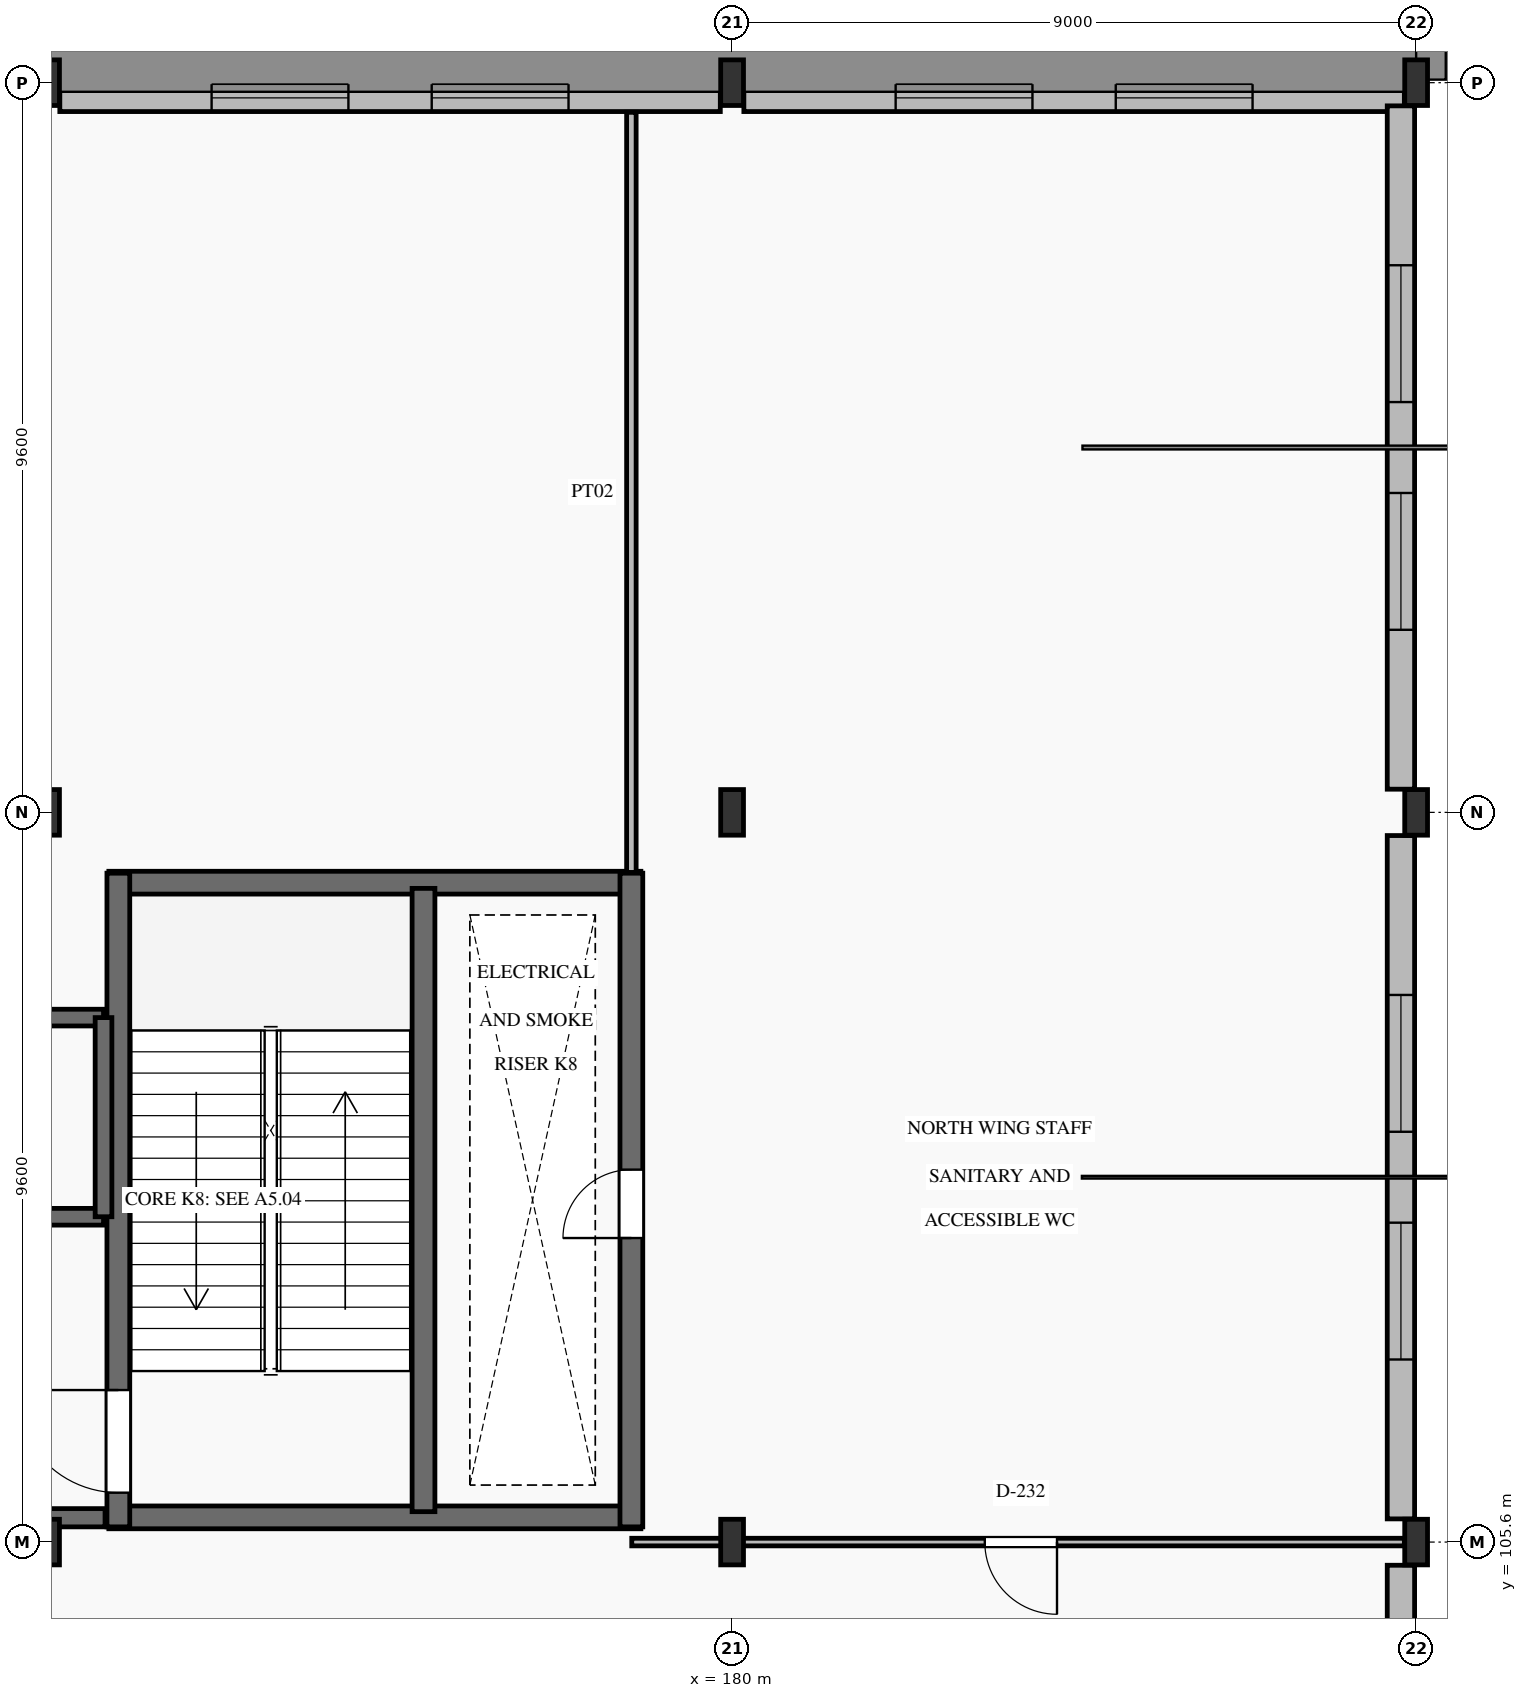
"""IFC4 building model, lengths in metres.
Left out: names, types, materials, properties, quantities, classifications, styles, units other than length and angle.
Written with IfcOpenShell. Run it as: python <this file> out.ifc"""

import sys

from ifc_helpers import new_model, si_unit, direction, frame, frame_2d, origin, origin_2d, place, context, subcontext, project, spatial, rectangle, i_section, extrude, element, fill, save


model = new_model("IFC4")
c1 = context("Model", 3, precision=1e-05, world=origin(), true_north=direction((0.0, 1.0)))
c2 = subcontext(c1, "Body", "Model", "MODEL_VIEW")
j1 = project(units=[si_unit("LENGTHUNIT", "METRE"), si_unit("PLANEANGLEUNIT", "RADIAN")], contexts=[c1])
p1 = place(None, origin())
s1 = spatial("IfcSite", under=j1, at=p1, CompositionType="ELEMENT")
p2 = place(p1, origin())
s2 = spatial("IfcBuilding", under=s1, at=p2, CompositionType="ELEMENT")
p3 = place(p2, origin())
s3 = spatial("IfcBuildingStorey", under=s2, at=p3, CompositionType="ELEMENT", Elevation=0.0)
for number, where, z_axis, x_axis in (
    (1, (171.0, 105.6, 0.0), (0.0, 0.0, 1.0), (1.0, 0.0, 0.0)),
    (2, (171.0, 115.2, 0.0), (0.0, 0.0, 1.0), (1.0, 0.0, 0.0)),
    (3, (171.0, 124.8, 0.0), (0.0, 0.0, 1.0), (1.0, 0.0, 0.0)),
    (4, (180.0, 105.6, 0.0), (0.0, 0.0, 1.0), (1.0, 0.0, 0.0)),
    (5, (180.0, 115.2, 0.0), (0.0, 0.0, 1.0), (1.0, 0.0, 0.0)),
    (6, (180.0, 124.8, 0.0), (0.0, 0.0, 1.0), (1.0, 0.0, 0.0)),
    (7, (189.0, 105.6, 0.0), (0.0, 0.0, 1.0), (1.0, 0.0, 0.0)),
    (8, (189.0, 115.2, 0.0), (0.0, 0.0, 1.0), (1.0, 0.0, 0.0)),
    (9, (189.0, 124.8, 0.0), (0.0, 0.0, 1.0), (1.0, 0.0, 0.0)),
):
    element("IfcColumn", number, at=place(p3, frame(where, z_axis=z_axis, x_axis=x_axis)), inside=s3, PredefinedType="COLUMN", context=c2, shape_type="SweptSolid", body=[
        extrude(i_section(OverallWidth=0.3, OverallDepth=0.6, WebThickness=0.015, FlangeThickness=0.03, FilletRadius=0.027, at=origin_2d()), origin(), (0.0, 0.0, 1.0), 6.0),
    ])
p4 = place(p3, frame((171.155, 124.6, 0.0), z_axis=(0.0, 0.0, 1.0), x_axis=(1.0, 0.0, 0.0)))
e10 = element("IfcWall", 10, at=p4, inside=s3, PredefinedType="SOLIDWALL", context=c2, shape_type="SweptSolid", body=[
    extrude(rectangle(XDim=8.69, YDim=0.36, at=frame_2d((4.345, 0.0))), origin(), (0.0, 0.0, 1.0), 5.49),
])
p5 = place(p4, frame((1.997, 0.0, 0.95)))
e11 = element("IfcOpeningElement", 11, at=p5, cuts=e10, PredefinedType="OPENING", context=c2, shape_type="SweptSolid", body=[
    extrude(rectangle(XDim=1.8, YDim=2.8, at=frame_2d((0.9, 1.4))), frame((0.0, 0.195, 0.0), z_axis=(0.0, -1.0, 0.0), x_axis=(1.0, 0.0, 0.0)), (0.0, 0.0, 1.0), 0.39),
])
p6 = place(p4, frame((4.893, 0.0, 0.95)))
e12 = element("IfcOpeningElement", 12, at=p6, cuts=e10, PredefinedType="OPENING", context=c2, shape_type="SweptSolid", body=[
    extrude(rectangle(XDim=1.8, YDim=2.8, at=frame_2d((0.9, 1.4))), frame((0.0, 0.195, 0.0), z_axis=(0.0, -1.0, 0.0), x_axis=(1.0, 0.0, 0.0)), (0.0, 0.0, 1.0), 0.39),
])
p7 = place(p3, frame((180.155, 124.6, 0.0), z_axis=(0.0, 0.0, 1.0), x_axis=(1.0, 0.0, 0.0)))
e13 = element("IfcWall", 13, at=p7, inside=s3, PredefinedType="SOLIDWALL", context=c2, shape_type="SweptSolid", body=[
    extrude(rectangle(XDim=8.69, YDim=0.36, at=frame_2d((4.345, 0.0))), origin(), (0.0, 0.0, 1.0), 5.49),
])
p8 = place(p7, frame((1.997, 0.0, 0.95)))
e14 = element("IfcOpeningElement", 14, at=p8, cuts=e13, PredefinedType="OPENING", context=c2, shape_type="SweptSolid", body=[
    extrude(rectangle(XDim=1.8, YDim=2.8, at=frame_2d((0.9, 1.4))), frame((0.0, 0.195, 0.0), z_axis=(0.0, -1.0, 0.0), x_axis=(1.0, 0.0, 0.0)), (0.0, 0.0, 1.0), 0.39),
])
p9 = place(p7, frame((4.893, 0.0, 0.95)))
e15 = element("IfcOpeningElement", 15, at=p9, cuts=e13, PredefinedType="OPENING", context=c2, shape_type="SweptSolid", body=[
    extrude(rectangle(XDim=1.8, YDim=2.8, at=frame_2d((0.9, 1.4))), frame((0.0, 0.195, 0.0), z_axis=(0.0, -1.0, 0.0), x_axis=(1.0, 0.0, 0.0)), (0.0, 0.0, 1.0), 0.39),
])
p10 = place(p3, frame((188.8, 96.305, 0.0), z_axis=(0.0, 0.0, 1.0), x_axis=(0.0, 1.0, 0.0)))
e16 = element("IfcWall", 16, at=p10, inside=s3, PredefinedType="SOLIDWALL", context=c2, shape_type="SweptSolid", body=[
    extrude(rectangle(XDim=8.99, YDim=0.36, at=frame_2d((4.495, 0.0))), origin(), (0.0, 0.0, 1.0), 5.4),
])
p11 = place(p10, frame((2.097, 0.0, 0.95)))
e17 = element("IfcOpeningElement", 17, at=p11, cuts=e16, PredefinedType="OPENING", context=c2, shape_type="SweptSolid", body=[
    extrude(rectangle(XDim=1.8, YDim=2.8, at=frame_2d((0.9, 1.4))), frame((0.0, 0.195, 0.0), z_axis=(0.0, -1.0, 0.0), x_axis=(1.0, 0.0, 0.0)), (0.0, 0.0, 1.0), 0.39),
])
p12 = place(p10, frame((5.093, 0.0, 0.95)))
e18 = element("IfcOpeningElement", 18, at=p12, cuts=e16, PredefinedType="OPENING", context=c2, shape_type="SweptSolid", body=[
    extrude(rectangle(XDim=1.8, YDim=2.8, at=frame_2d((0.9, 1.4))), frame((0.0, 0.195, 0.0), z_axis=(0.0, -1.0, 0.0), x_axis=(1.0, 0.0, 0.0)), (0.0, 0.0, 1.0), 0.39),
])
p13 = place(p3, frame((188.8, 105.905, 0.0), z_axis=(0.0, 0.0, 1.0), x_axis=(0.0, 1.0, 0.0)))
e19 = element("IfcWall", 19, at=p13, inside=s3, PredefinedType="SOLIDWALL", context=c2, shape_type="SweptSolid", body=[
    extrude(rectangle(XDim=8.99, YDim=0.36, at=frame_2d((4.495, 0.0))), origin(), (0.0, 0.0, 1.0), 5.4),
])
p14 = place(p13, frame((2.097, 0.0, 0.95)))
e20 = element("IfcOpeningElement", 20, at=p14, cuts=e19, PredefinedType="OPENING", context=c2, shape_type="SweptSolid", body=[
    extrude(rectangle(XDim=1.8, YDim=2.8, at=frame_2d((0.9, 1.4))), frame((0.0, 0.195, 0.0), z_axis=(0.0, -1.0, 0.0), x_axis=(1.0, 0.0, 0.0)), (0.0, 0.0, 1.0), 0.39),
])
p15 = place(p13, frame((5.093, 0.0, 0.95)))
e21 = element("IfcOpeningElement", 21, at=p15, cuts=e19, PredefinedType="OPENING", context=c2, shape_type="SweptSolid", body=[
    extrude(rectangle(XDim=1.8, YDim=2.8, at=frame_2d((0.9, 1.4))), frame((0.0, 0.195, 0.0), z_axis=(0.0, -1.0, 0.0), x_axis=(1.0, 0.0, 0.0)), (0.0, 0.0, 1.0), 0.39),
])
p16 = place(p3, frame((188.8, 115.505, 0.0), z_axis=(0.0, 0.0, 1.0), x_axis=(0.0, 1.0, 0.0)))
e22 = element("IfcWall", 22, at=p16, inside=s3, PredefinedType="SOLIDWALL", context=c2, shape_type="SweptSolid", body=[
    extrude(rectangle(XDim=8.99, YDim=0.36, at=frame_2d((4.495, 0.0))), origin(), (0.0, 0.0, 1.0), 5.4),
])
p17 = place(p16, frame((2.097, 0.0, 0.95)))
e23 = element("IfcOpeningElement", 23, at=p17, cuts=e22, PredefinedType="OPENING", context=c2, shape_type="SweptSolid", body=[
    extrude(rectangle(XDim=1.8, YDim=2.8, at=frame_2d((0.9, 1.4))), frame((0.0, 0.195, 0.0), z_axis=(0.0, -1.0, 0.0), x_axis=(1.0, 0.0, 0.0)), (0.0, 0.0, 1.0), 0.39),
])
p18 = place(p16, frame((5.093, 0.0, 0.95)))
e24 = element("IfcOpeningElement", 24, at=p18, cuts=e22, PredefinedType="OPENING", context=c2, shape_type="SweptSolid", body=[
    extrude(rectangle(XDim=1.8, YDim=2.8, at=frame_2d((0.9, 1.4))), frame((0.0, 0.195, 0.0), z_axis=(0.0, -1.0, 0.0), x_axis=(1.0, 0.0, 0.0)), (0.0, 0.0, 1.0), 0.39),
])
for number, where, z_axis, x_axis in (
    (25, (171.8, 105.925, 0.0), (0.0, 0.0, 1.0), (1.0, 0.0, 0.0)),
    (26, (171.8, 114.275, 0.0), (0.0, 0.0, 1.0), (1.0, 0.0, 0.0)),
):
    element("IfcWall", number, at=place(p3, frame(where, z_axis=z_axis, x_axis=x_axis)), inside=s3, PredefinedType="SHEAR", context=c2, shape_type="SweptSolid", body=[
        extrude(rectangle(XDim=7.0, YDim=0.3, at=frame_2d((3.5, 0.0))), origin(), (0.0, 0.0, 1.0), 6.0),
    ])
p19 = place(p3, frame((171.925, 105.8, 0.0), z_axis=(0.0, 0.0, 1.0), x_axis=(0.0, 1.0, 0.0)))
e27 = element("IfcWall", 27, at=p19, inside=s3, PredefinedType="SHEAR", context=c2, shape_type="SweptSolid", body=[
    extrude(rectangle(XDim=8.6, YDim=0.3, at=frame_2d((4.3, 0.0))), origin(), (0.0, 0.0, 1.0), 6.0),
])
p20 = place(p19, frame((0.45, 0.0, 0.0)))
e28 = element("IfcOpeningElement", 28, at=p20, cuts=e27, PredefinedType="OPENING", context=c2, shape_type="SweptSolid", body=[
    extrude(rectangle(XDim=1.35, YDim=2.2, at=frame_2d((0.675, 1.1))), frame((0.0, 0.165, 0.0), z_axis=(0.0, -1.0, 0.0), x_axis=(1.0, 0.0, 0.0)), (0.0, 0.0, 1.0), 0.33),
])
p21 = place(p3, frame((178.675, 105.8, 0.0), z_axis=(0.0, 0.0, 1.0), x_axis=(0.0, 1.0, 0.0)))
e29 = element("IfcWall", 29, at=p21, inside=s3, PredefinedType="SHEAR", context=c2, shape_type="SweptSolid", body=[
    extrude(rectangle(XDim=8.6, YDim=0.3, at=frame_2d((4.3, 0.0))), origin(), (0.0, 0.0, 1.0), 6.0),
])
p22 = place(p21, frame((3.8, 0.0, 0.0)))
e30 = element("IfcOpeningElement", 30, at=p22, cuts=e29, PredefinedType="OPENING", context=c2, shape_type="SweptSolid", body=[
    extrude(rectangle(XDim=0.9, YDim=2.05, at=frame_2d((0.45, 1.025))), frame((0.0, 0.165, 0.0), z_axis=(0.0, -1.0, 0.0), x_axis=(1.0, 0.0, 0.0)), (0.0, 0.0, 1.0), 0.33),
])
p23 = place(p3, frame((175.94, 106.0, 0.0), z_axis=(0.0, 0.0, 1.0), x_axis=(0.0, 1.0, 0.0)))
e31 = element("IfcWall", 31, at=p23, inside=s3, PredefinedType="SHEAR", context=c2, shape_type="SweptSolid", body=[
    extrude(rectangle(XDim=8.2, YDim=0.3, at=frame_2d((4.1, 0.0))), origin(), (0.0, 0.0, 1.0), 6.0),
])
p24 = place(p3, frame((167.55, 105.92, 0.0), z_axis=(0.0, 0.0, 1.0), x_axis=(1.0, 0.0, 0.0)))
e32 = element("IfcWall", 32, at=p24, inside=s3, PredefinedType="SHEAR", context=c2, shape_type="SweptSolid", body=[
    extrude(rectangle(XDim=4.2, YDim=0.24, at=frame_2d((2.1, 0.0))), origin(), (0.0, 0.0, 1.0), 6.0),
])
p25 = place(p24, frame((0.35, 0.0, 0.0)))
e33 = element("IfcOpeningElement", 33, at=p25, cuts=e32, PredefinedType="OPENING", context=c2, shape_type="SweptSolid", body=[
    extrude(rectangle(XDim=1.4, YDim=2.2, at=frame_2d((0.7, 1.1))), frame((0.0, 0.135, 0.0), z_axis=(0.0, -1.0, 0.0), x_axis=(1.0, 0.0, 0.0)), (0.0, 0.0, 1.0), 0.27),
])
p26 = place(p3, frame((167.57, 109.88, 0.0), z_axis=(0.0, 0.0, 1.0), x_axis=(1.0, 0.0, 0.0)))
e34 = element("IfcWall", 34, at=p26, inside=s3, PredefinedType="SHEAR", context=c2, shape_type="SweptSolid", body=[
    extrude(rectangle(XDim=4.16, YDim=0.22, at=frame_2d((2.08, 0.0))), origin(), (0.0, 0.0, 1.0), 6.0),
])
p27 = place(p26, frame((1.53, 0.0, 0.0)))
e35 = element("IfcOpeningElement", 35, at=p27, cuts=e34, PredefinedType="OPENING", context=c2, shape_type="SweptSolid", body=[
    extrude(rectangle(XDim=1.1, YDim=2.15, at=frame_2d((0.55, 1.075))), frame((0.0, 0.125, 0.0), z_axis=(0.0, -1.0, 0.0), x_axis=(1.0, 0.0, 0.0)), (0.0, 0.0, 1.0), 0.25),
])
p28 = place(p3, frame((167.57, 112.5, 0.0), z_axis=(0.0, 0.0, 1.0), x_axis=(1.0, 0.0, 0.0)))
e36 = element("IfcWall", 36, at=p28, inside=s3, PredefinedType="SHEAR", context=c2, shape_type="SweptSolid", body=[
    extrude(rectangle(XDim=4.16, YDim=0.22, at=frame_2d((2.08, 0.0))), origin(), (0.0, 0.0, 1.0), 6.0),
])
p29 = place(p3, frame((171.73, 109.88, 0.0), z_axis=(0.0, 0.0, 1.0), x_axis=(0.0, 1.0, 0.0)))
e37 = element("IfcWall", 37, at=p29, inside=s3, PredefinedType="SHEAR", context=c2, shape_type="SweptSolid", body=[
    extrude(rectangle(XDim=2.62, YDim=0.22, at=frame_2d((1.31, 0.0))), origin(), (0.0, 0.0, 1.0), 6.0),
])
p30 = place(p3, frame((178.68, 105.6, 0.0), z_axis=(0.0, 0.0, 1.0), x_axis=(1.0, 0.0, 0.0)))
e38 = element("IfcWall", 38, at=p30, inside=s3, PredefinedType="PARTITIONING", context=c2, shape_type="SweptSolid", body=[
    extrude(rectangle(XDim=10.165, YDim=0.1, at=frame_2d((5.083, 0.0))), origin(), (0.0, 0.0, 1.0), 5.37),
])
p31 = place(p30, frame((4.645, 0.0, 0.0)))
e39 = element("IfcOpeningElement", 39, at=p31, cuts=e38, PredefinedType="OPENING", context=c2, shape_type="SweptSolid", body=[
    extrude(rectangle(XDim=0.95, YDim=2.1, at=frame_2d((0.475, 1.05))), frame((0.0, 0.065, 0.0), z_axis=(0.0, -1.0, 0.0), x_axis=(1.0, 0.0, 0.0)), (0.0, 0.0, 1.0), 0.13),
])
p32 = place(p3, frame((178.675, 114.41, 0.0), z_axis=(0.0, 0.0, 1.0), x_axis=(0.0, 1.0, 0.0)))
e40 = element("IfcWall", 40, at=p32, inside=s3, PredefinedType="PARTITIONING", context=c2, shape_type="SweptSolid", body=[
    extrude(rectangle(XDim=10.0, YDim=0.125, at=frame_2d((5.0, 0.0))), origin(), (0.0, 0.0, 1.0), 5.72),
])
p33 = place(p5, origin())
e41 = element("IfcWindow", 41, at=p33, inside=s3, PartitioningType="SINGLE_PANEL", PredefinedType="WINDOW", context=c2, shape_type="SweptSolid", body=[
    extrude(rectangle(XDim=1.8, YDim=2.8, at=frame_2d((0.9, 1.4))), frame((0.0, 0.03, 0.0), z_axis=(0.0, -1.0, 0.0), x_axis=(1.0, 0.0, 0.0)), (0.0, 0.0, 1.0), 0.06),
])
fill(e11, e41)
p34 = place(p6, origin())
e42 = element("IfcWindow", 42, at=p34, inside=s3, PartitioningType="SINGLE_PANEL", PredefinedType="WINDOW", context=c2, shape_type="SweptSolid", body=[
    extrude(rectangle(XDim=1.8, YDim=2.8, at=frame_2d((0.9, 1.4))), frame((0.0, 0.03, 0.0), z_axis=(0.0, -1.0, 0.0), x_axis=(1.0, 0.0, 0.0)), (0.0, 0.0, 1.0), 0.06),
])
fill(e12, e42)
p35 = place(p8, origin())
e43 = element("IfcWindow", 43, at=p35, inside=s3, PartitioningType="SINGLE_PANEL", PredefinedType="WINDOW", context=c2, shape_type="SweptSolid", body=[
    extrude(rectangle(XDim=1.8, YDim=2.8, at=frame_2d((0.9, 1.4))), frame((0.0, 0.03, 0.0), z_axis=(0.0, -1.0, 0.0), x_axis=(1.0, 0.0, 0.0)), (0.0, 0.0, 1.0), 0.06),
])
fill(e14, e43)
p36 = place(p9, origin())
e44 = element("IfcWindow", 44, at=p36, inside=s3, PartitioningType="SINGLE_PANEL", PredefinedType="WINDOW", context=c2, shape_type="SweptSolid", body=[
    extrude(rectangle(XDim=1.8, YDim=2.8, at=frame_2d((0.9, 1.4))), frame((0.0, 0.03, 0.0), z_axis=(0.0, -1.0, 0.0), x_axis=(1.0, 0.0, 0.0)), (0.0, 0.0, 1.0), 0.06),
])
fill(e15, e44)
p37 = place(p14, origin())
e45 = element("IfcWindow", 45, at=p37, inside=s3, PartitioningType="SINGLE_PANEL", PredefinedType="WINDOW", context=c2, shape_type="SweptSolid", body=[
    extrude(rectangle(XDim=1.8, YDim=2.8, at=frame_2d((0.9, 1.4))), frame((0.0, 0.03, 0.0), z_axis=(0.0, -1.0, 0.0), x_axis=(1.0, 0.0, 0.0)), (0.0, 0.0, 1.0), 0.06),
])
fill(e20, e45)
p38 = place(p15, origin())
e46 = element("IfcWindow", 46, at=p38, inside=s3, PartitioningType="SINGLE_PANEL", PredefinedType="WINDOW", context=c2, shape_type="SweptSolid", body=[
    extrude(rectangle(XDim=1.8, YDim=2.8, at=frame_2d((0.9, 1.4))), frame((0.0, 0.03, 0.0), z_axis=(0.0, -1.0, 0.0), x_axis=(1.0, 0.0, 0.0)), (0.0, 0.0, 1.0), 0.06),
])
fill(e21, e46)
p39 = place(p17, origin())
e47 = element("IfcWindow", 47, at=p39, inside=s3, PartitioningType="SINGLE_PANEL", PredefinedType="WINDOW", context=c2, shape_type="SweptSolid", body=[
    extrude(rectangle(XDim=1.8, YDim=2.8, at=frame_2d((0.9, 1.4))), frame((0.0, 0.03, 0.0), z_axis=(0.0, -1.0, 0.0), x_axis=(1.0, 0.0, 0.0)), (0.0, 0.0, 1.0), 0.06),
])
fill(e23, e47)
p40 = place(p18, origin())
e48 = element("IfcWindow", 48, at=p40, inside=s3, PartitioningType="SINGLE_PANEL", PredefinedType="WINDOW", context=c2, shape_type="SweptSolid", body=[
    extrude(rectangle(XDim=1.8, YDim=2.8, at=frame_2d((0.9, 1.4))), frame((0.0, 0.03, 0.0), z_axis=(0.0, -1.0, 0.0), x_axis=(1.0, 0.0, 0.0)), (0.0, 0.0, 1.0), 0.06),
])
fill(e24, e48)
p41 = place(p20, origin())
e49 = element("IfcDoor", 49, at=p41, inside=s3, OperationType="SINGLE_SWING_RIGHT", PredefinedType="DOOR", context=c2, shape_type="SweptSolid", body=[
    extrude(rectangle(XDim=1.35, YDim=2.2, at=frame_2d((0.675, 1.1))), frame((0.0, 0.025, 0.0), z_axis=(0.0, -1.0, 0.0), x_axis=(1.0, 0.0, 0.0)), (0.0, 0.0, 1.0), 0.05),
])
fill(e28, e49)
p42 = place(p22, origin())
e50 = element("IfcDoor", 50, at=p42, inside=s3, OperationType="SINGLE_SWING_LEFT", PredefinedType="DOOR", context=c2, shape_type="SweptSolid", body=[
    extrude(rectangle(XDim=0.9, YDim=2.05, at=frame_2d((0.45, 1.025))), frame((0.0, 0.025, 0.0), z_axis=(0.0, -1.0, 0.0), x_axis=(1.0, 0.0, 0.0)), (0.0, 0.0, 1.0), 0.05),
])
fill(e30, e50)
p43 = place(p31, frame((0.95, 0.0, 0.0), z_axis=(0.0, 0.0, 1.0), x_axis=(-1.0, 0.0, 0.0)))
e51 = element("IfcDoor", 51, at=p43, inside=s3, OperationType="SINGLE_SWING_RIGHT", PredefinedType="DOOR", context=c2, shape_type="SweptSolid", body=[
    extrude(rectangle(XDim=0.95, YDim=2.1, at=frame_2d((0.475, 1.05))), frame((0.0, 0.025, 0.0), z_axis=(0.0, -1.0, 0.0), x_axis=(1.0, 0.0, 0.0)), (0.0, 0.0, 1.0), 0.05),
])
fill(e39, e51)
save(model, sys.argv[1])
